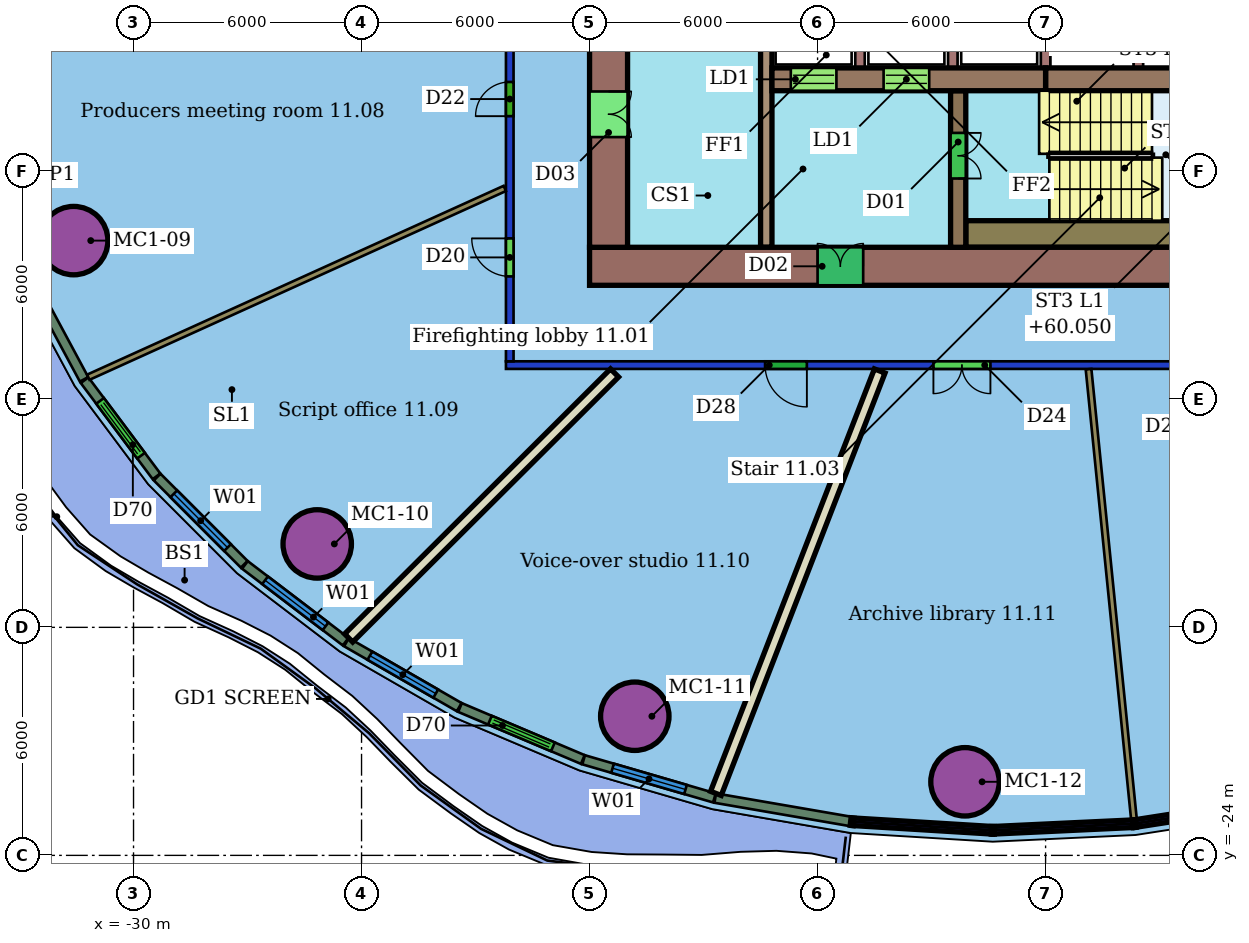
"""IFC4 building model, lengths in metres.
Left out: names, types, materials, properties, quantities, classifications, styles, units other than length and angle.
Written with IfcOpenShell. Run it as: python <this file> out.ifc"""

import sys

from ifc_helpers import new_model, si_unit, direction, frame, frame_2d, origin, origin_2d, place, context, subcontext, project, spatial, rectangle, hollow_circle, extrude, element, fill, save


model = new_model("IFC4")
c1 = context("Model", 3, precision=1e-05, world=origin(), true_north=direction((0.0, 1.0)))
c2 = subcontext(c1, "Body", "Model", "MODEL_VIEW")
j1 = project(units=[si_unit("LENGTHUNIT", "METRE"), si_unit("PLANEANGLEUNIT", "RADIAN")], contexts=[c1])
p1 = place(None, origin())
s1 = spatial("IfcSite", under=j1, at=p1, CompositionType="ELEMENT")
p2 = place(p1, origin())
s2 = spatial("IfcBuilding", under=s1, at=p2, CompositionType="ELEMENT")
p3 = place(p2, frame((0.0, 0.0, 58.2)))
s3 = spatial("IfcBuildingStorey", under=s2, at=p3, CompositionType="ELEMENT", Elevation=58.2)
for number, where, z_axis, x_axis in (
    (1, (-31.575, -7.824, 0.0), (0.0, 0.0, 1.0), (1.0, 0.0, 0.0)),
    (2, (-25.166, -15.805, 0.0), (0.0, 0.0, 1.0), (1.0, 0.0, 0.0)),
    (3, (-16.81, -20.339, 0.0), (0.0, 0.0, 1.0), (1.0, 0.0, 0.0)),
    (4, (-8.121, -22.064, 0.0), (0.0, 0.0, 1.0), (1.0, 0.0, 0.0)),
):
    element("IfcColumn", number, at=place(p3, frame(where, z_axis=z_axis, x_axis=x_axis)), inside=s3, PredefinedType="COLUMN", context=c2, shape_type="SweptSolid", body=[
        extrude(hollow_circle(Radius=0.9, WallThickness=0.06, at=origin_2d()), origin(), (0.0, 0.0, 1.0), 3.55),
    ])
p4 = place(p3, frame((8.2, -11.1, 0.0), z_axis=(0.0, 0.0, 1.0), x_axis=(-1.0, 0.0, 0.0)))
e5 = element("IfcWall", 5, at=p4, inside=s3, PredefinedType="PARTITIONING", context=c2, shape_type="SweptSolid", body=[
    extrude(rectangle(XDim=28.4, YDim=0.2, at=frame_2d((14.2, 0.0))), origin(), (0.0, 0.0, 1.0), 2.85),
])
p5 = place(p4, frame((20.481, 0.0, 0.0)))
e6 = element("IfcOpeningElement", 6, at=p5, cuts=e5, PredefinedType="OPENING", context=c2, shape_type="SweptSolid", body=[
    extrude(rectangle(XDim=1.1, YDim=2.1, at=frame_2d((0.55, 1.05))), frame((0.0, 0.11, 0.0), z_axis=(0.0, -1.0, 0.0), x_axis=(1.0, 0.0, 0.0)), (0.0, 0.0, 1.0), 0.22),
])
p6 = place(p4, frame((15.652, 0.0, 0.0)))
e7 = element("IfcOpeningElement", 7, at=p6, cuts=e5, PredefinedType="OPENING", context=c2, shape_type="SweptSolid", body=[
    extrude(rectangle(XDim=1.5, YDim=2.1, at=frame_2d((0.75, 1.05))), frame((0.0, 0.11, 0.0), z_axis=(0.0, -1.0, 0.0), x_axis=(1.0, 0.0, 0.0)), (0.0, 0.0, 1.0), 0.22),
])
p7 = place(p4, frame((7.719, 0.0, 0.0)))
e8 = element("IfcOpeningElement", 8, at=p7, cuts=e5, PredefinedType="OPENING", context=c2, shape_type="SweptSolid", body=[
    extrude(rectangle(XDim=1.8, YDim=2.1, at=frame_2d((0.9, 1.05))), frame((0.0, 0.11, 0.0), z_axis=(0.0, -1.0, 0.0), x_axis=(1.0, 0.0, 0.0)), (0.0, 0.0, 1.0), 0.22),
])
p8 = place(p3, frame((-20.1, -11.0, 0.0), z_axis=(0.0, 0.0, 1.0), x_axis=(0.0, 1.0, 0.0)))
e9 = element("IfcWall", 9, at=p8, inside=s3, PredefinedType="PARTITIONING", context=c2, shape_type="SweptSolid", body=[
    extrude(rectangle(XDim=22.0, YDim=0.2, at=frame_2d((11.0, 0.0))), origin(), (0.0, 0.0, 1.0), 2.85),
])
p9 = place(p8, frame((17.792, 0.0, 0.0)))
e10 = element("IfcOpeningElement", 10, at=p9, cuts=e9, PredefinedType="OPENING", context=c2, shape_type="SweptSolid", body=[
    extrude(rectangle(XDim=0.9, YDim=2.1, at=frame_2d((0.45, 1.05))), frame((0.0, 0.11, 0.0), z_axis=(0.0, -1.0, 0.0), x_axis=(1.0, 0.0, 0.0)), (0.0, 0.0, 1.0), 0.22),
])
p10 = place(p8, frame((13.558, 0.0, 0.0)))
e11 = element("IfcOpeningElement", 11, at=p10, cuts=e9, PredefinedType="OPENING", context=c2, shape_type="SweptSolid", body=[
    extrude(rectangle(XDim=1.1, YDim=2.1, at=frame_2d((0.55, 1.05))), frame((0.0, 0.11, 0.0), z_axis=(0.0, -1.0, 0.0), x_axis=(1.0, 0.0, 0.0)), (0.0, 0.0, 1.0), 0.22),
])
p11 = place(p8, frame((6.45, 0.0, 0.0)))
e12 = element("IfcOpeningElement", 12, at=p11, cuts=e9, PredefinedType="OPENING", context=c2, shape_type="SweptSolid", body=[
    extrude(rectangle(XDim=0.9, YDim=2.1, at=frame_2d((0.45, 1.05))), frame((0.0, 0.11, 0.0), z_axis=(0.0, -1.0, 0.0), x_axis=(1.0, 0.0, 0.0)), (0.0, 0.0, 1.0), 0.22),
])
p12 = place(p8, frame((2.234, 0.0, 0.0)))
e13 = element("IfcOpeningElement", 13, at=p12, cuts=e9, PredefinedType="OPENING", context=c2, shape_type="SweptSolid", body=[
    extrude(rectangle(XDim=1.0, YDim=2.1, at=frame_2d((0.5, 1.05))), frame((0.0, 0.11, 0.0), z_axis=(0.0, -1.0, 0.0), x_axis=(1.0, 0.0, 0.0)), (0.0, 0.0, 1.0), 0.22),
])
p13 = place(p3, frame((-31.19, -11.419, 0.0), z_axis=(0.0, 0.0, 1.0), x_axis=(0.91079054679, 0.412868719907, 0.0)))
e14 = element("IfcWall", 14, at=p13, inside=s3, PredefinedType="PARTITIONING", context=c2, shape_type="SweptSolid", body=[
    extrude(rectangle(XDim=12.033, YDim=0.15, at=frame_2d((6.017, 0.0))), origin(), (0.0, 0.0, 1.0), 3.55),
])
p14 = place(p3, frame((-24.339, -18.28, 0.0), z_axis=(0.0, 0.0, 1.0), x_axis=(0.708242772836, 0.705968961588, 0.0)))
e15 = element("IfcWall", 15, at=p14, inside=s3, PredefinedType="PARTITIONING", context=c2, shape_type="SweptSolid", body=[
    extrude(rectangle(XDim=9.878, YDim=0.3, at=frame_2d((4.939, 0.0))), origin(), (0.0, 0.0, 1.0), 3.55),
])
p15 = place(p3, frame((-14.676, -22.369, 0.0), z_axis=(0.0, 0.0, 1.0), x_axis=(0.361600153216, 0.932333271526, 0.0)))
e16 = element("IfcWall", 16, at=p15, inside=s3, PredefinedType="PARTITIONING", context=c2, shape_type="SweptSolid", body=[
    extrude(rectangle(XDim=11.921, YDim=0.3, at=frame_2d((5.961, 0.0))), origin(), (0.0, 0.0, 1.0), 3.55),
])
p16 = place(p3, frame((-3.676, -23.041, 0.0), z_axis=(0.0, 0.0, 1.0), x_axis=(-0.100357287096, 0.994951463603, 0.0)))
e17 = element("IfcWall", 17, at=p16, inside=s3, PredefinedType="PARTITIONING", context=c2, shape_type="SweptSolid", body=[
    extrude(rectangle(XDim=11.894, YDim=0.15, at=frame_2d((5.947, 0.0))), origin(), (0.0, 0.0, 1.0), 3.55),
])
p17 = place(p3, frame((-32.745, -8.79, 0.0), z_axis=(0.0, 0.0, 1.0), x_axis=(0.473545649415, -0.880769276213, 0.0)))
e18 = element("IfcWall", 18, at=p17, inside=s3, PredefinedType="SOLIDWALL", context=c2, shape_type="SweptSolid", body=[
    extrude(rectangle(XDim=3.048, YDim=0.25, at=frame_2d((1.524, 0.0))), origin(), (0.0, 0.0, 1.0), 3.15),
])
p18 = place(p3, frame((-31.288, -11.497, 0.0), z_axis=(0.0, 0.0, 1.0), x_axis=(0.59907224047, -0.800694979813, 0.0)))
e19 = element("IfcWall", 19, at=p18, inside=s3, PredefinedType="SOLIDWALL", context=c2, shape_type="SweptSolid", body=[
    extrude(rectangle(XDim=3.159, YDim=0.25, at=frame_2d((1.58, 0.0))), origin(), (0.0, 0.0, 1.0), 3.15),
])
p19 = place(p18, frame((0.68, 0.0, 0.0)))
e20 = element("IfcOpeningElement", 20, at=p19, cuts=e19, PredefinedType="OPENING", context=c2, shape_type="SweptSolid", body=[
    extrude(rectangle(XDim=1.8, YDim=2.4, at=frame_2d((0.9, 1.2))), frame((0.0, 0.135, 0.0), z_axis=(0.0, -1.0, 0.0), x_axis=(1.0, 0.0, 0.0)), (0.0, 0.0, 1.0), 0.27),
])
p20 = place(p3, frame((-29.378, -14.046, 0.0), z_axis=(0.0, 0.0, 1.0), x_axis=(0.706541864319, -0.707671247095, 0.0)))
e21 = element("IfcWall", 21, at=p20, inside=s3, PredefinedType="SOLIDWALL", context=c2, shape_type="SweptSolid", body=[
    extrude(rectangle(XDim=3.243, YDim=0.25, at=frame_2d((1.621, 0.0))), origin(), (0.0, 0.0, 1.0), 3.15),
])
p21 = place(p20, frame((0.621, 0.0, 0.8)))
e22 = element("IfcOpeningElement", 22, at=p21, cuts=e21, PredefinedType="OPENING", context=c2, shape_type="SweptSolid", body=[
    extrude(rectangle(XDim=2.0, YDim=2.2, at=frame_2d((1.0, 1.1))), frame((0.0, 0.135, 0.0), z_axis=(0.0, -1.0, 0.0), x_axis=(1.0, 0.0, 0.0)), (0.0, 0.0, 1.0), 0.27),
])
p22 = place(p3, frame((-27.069, -16.357, 0.0), z_axis=(0.0, 0.0, 1.0), x_axis=(0.795504012695, -0.605948319402, 0.0)))
e23 = element("IfcWall", 23, at=p22, inside=s3, PredefinedType="SOLIDWALL", context=c2, shape_type="SweptSolid", body=[
    extrude(rectangle(XDim=3.333, YDim=0.25, at=frame_2d((1.667, 0.0))), origin(), (0.0, 0.0, 1.0), 3.15),
])
p23 = place(p22, frame((0.667, 0.0, 0.8)))
e24 = element("IfcOpeningElement", 24, at=p23, cuts=e23, PredefinedType="OPENING", context=c2, shape_type="SweptSolid", body=[
    extrude(rectangle(XDim=2.0, YDim=2.2, at=frame_2d((1.0, 1.1))), frame((0.0, 0.135, 0.0), z_axis=(0.0, -1.0, 0.0), x_axis=(1.0, 0.0, 0.0)), (0.0, 0.0, 1.0), 0.27),
])
p24 = place(p3, frame((-24.397, -18.39, 0.0), z_axis=(0.0, 0.0, 1.0), x_axis=(0.866535553406, -0.499115352081, 0.0)))
e25 = element("IfcWall", 25, at=p24, inside=s3, PredefinedType="SOLIDWALL", context=c2, shape_type="SweptSolid", body=[
    extrude(rectangle(XDim=3.424, YDim=0.25, at=frame_2d((1.712, 0.0))), origin(), (0.0, 0.0, 1.0), 3.15),
])
p25 = place(p24, frame((0.712, 0.0, 0.8)))
e26 = element("IfcOpeningElement", 26, at=p25, cuts=e25, PredefinedType="OPENING", context=c2, shape_type="SweptSolid", body=[
    extrude(rectangle(XDim=2.0, YDim=2.2, at=frame_2d((1.0, 1.1))), frame((0.0, 0.135, 0.0), z_axis=(0.0, -1.0, 0.0), x_axis=(1.0, 0.0, 0.0)), (0.0, 0.0, 1.0), 0.27),
])
p26 = place(p3, frame((-21.409, -20.109, 0.0), z_axis=(0.0, 0.0, 1.0), x_axis=(0.920920201112, -0.389751181119, 0.0)))
e27 = element("IfcWall", 27, at=p26, inside=s3, PredefinedType="SOLIDWALL", context=c2, shape_type="SweptSolid", body=[
    extrude(rectangle(XDim=3.51, YDim=0.25, at=frame_2d((1.755, 0.0))), origin(), (0.0, 0.0, 1.0), 3.15),
])
p27 = place(p26, frame((0.855, 0.0, 0.0)))
e28 = element("IfcOpeningElement", 28, at=p27, cuts=e27, PredefinedType="OPENING", context=c2, shape_type="SweptSolid", body=[
    extrude(rectangle(XDim=1.8, YDim=2.4, at=frame_2d((0.9, 1.2))), frame((0.0, 0.135, 0.0), z_axis=(0.0, -1.0, 0.0), x_axis=(1.0, 0.0, 0.0)), (0.0, 0.0, 1.0), 0.27),
])
p28 = place(p3, frame((-18.156, -21.485, 0.0), z_axis=(0.0, 0.0, 1.0), x_axis=(0.960066333869, -0.279772469287, 0.0)))
e29 = element("IfcWall", 29, at=p28, inside=s3, PredefinedType="SOLIDWALL", context=c2, shape_type="SweptSolid", body=[
    extrude(rectangle(XDim=3.585, YDim=0.25, at=frame_2d((1.792, 0.0))), origin(), (0.0, 0.0, 1.0), 3.15),
])
p29 = place(p28, frame((0.792, 0.0, 0.8)))
e30 = element("IfcOpeningElement", 30, at=p29, cuts=e29, PredefinedType="OPENING", context=c2, shape_type="SweptSolid", body=[
    extrude(rectangle(XDim=2.0, YDim=2.2, at=frame_2d((1.0, 1.1))), frame((0.0, 0.135, 0.0), z_axis=(0.0, -1.0, 0.0), x_axis=(1.0, 0.0, 0.0)), (0.0, 0.0, 1.0), 0.27),
])
p30 = place(p3, frame((-14.693, -22.493, 0.0), z_axis=(0.0, 0.0, 1.0), x_axis=(0.985456592012, -0.169927352892, 0.0)))
e31 = element("IfcWall", 31, at=p30, inside=s3, PredefinedType="SOLIDWALL", context=c2, shape_type="SweptSolid", body=[
    extrude(rectangle(XDim=3.6, YDim=0.25, at=frame_2d((1.8, 0.0))), origin(), (0.0, 0.0, 1.0), 3.15),
])
p31 = place(p3, frame((-18.0, -8.5, 0.0), z_axis=(0.0, 0.0, 1.0), x_axis=(1.0, 0.0, 0.0)))
e32 = element("IfcWall", 32, at=p31, inside=s3, PredefinedType="SHEAR", context=c2, shape_type="SweptSolid", body=[
    extrude(rectangle(XDim=24.0, YDim=1.0, at=frame_2d((12.0, 0.0))), origin(), (0.0, 0.0, 1.0), 3.4),
])
p32 = place(p31, frame((6.0, 0.0, 0.0)))
e33 = element("IfcOpeningElement", 33, at=p32, cuts=e32, PredefinedType="OPENING", context=c2, shape_type="SweptSolid", body=[
    extrude(rectangle(XDim=1.2, YDim=2.1, at=frame_2d((0.6, 1.05))), frame((0.0, 0.51, 0.0), z_axis=(0.0, -1.0, 0.0), x_axis=(1.0, 0.0, 0.0)), (0.0, 0.0, 1.0), 1.02),
])
p33 = place(p3, frame((-17.5, 8.0, 0.0), z_axis=(0.0, 0.0, 1.0), x_axis=(0.0, -1.0, 0.0)))
e34 = element("IfcWall", 34, at=p33, inside=s3, PredefinedType="SHEAR", context=c2, shape_type="SweptSolid", body=[
    extrude(rectangle(XDim=16.0, YDim=1.0, at=frame_2d((8.0, 0.0))), origin(), (0.0, 0.0, 1.0), 3.4),
])
p34 = place(p33, frame((11.9, 0.0, 0.0)))
e35 = element("IfcOpeningElement", 35, at=p34, cuts=e34, PredefinedType="OPENING", context=c2, shape_type="SweptSolid", body=[
    extrude(rectangle(XDim=1.2, YDim=2.1, at=frame_2d((0.6, 1.05))), frame((0.0, 0.51, 0.0), z_axis=(0.0, -1.0, 0.0), x_axis=(1.0, 0.0, 0.0)), (0.0, 0.0, 1.0), 1.02),
])
p35 = place(p33, frame((2.9, 0.0, 0.0)))
e36 = element("IfcOpeningElement", 36, at=p35, cuts=e34, PredefinedType="OPENING", context=c2, shape_type="SweptSolid", body=[
    extrude(rectangle(XDim=1.2, YDim=2.1, at=frame_2d((0.6, 1.05))), frame((0.0, 0.51, 0.0), z_axis=(0.0, -1.0, 0.0), x_axis=(1.0, 0.0, 0.0)), (0.0, 0.0, 1.0), 1.02),
])
p36 = place(p3, frame((-13.2, -3.58, 0.0), z_axis=(0.0, 0.0, 1.0), x_axis=(1.0, 0.0, 0.0)))
e37 = element("IfcWall", 37, at=p36, inside=s3, PredefinedType="SHEAR", context=c2, shape_type="SweptSolid", body=[
    extrude(rectangle(XDim=7.2, YDim=0.6, at=frame_2d((3.6, 0.0))), origin(), (0.0, 0.0, 1.0), 3.4),
])
p37 = place(p36, frame((0.496, 0.0, 0.0)))
e38 = element("IfcOpeningElement", 38, at=p37, cuts=e37, PredefinedType="OPENING", context=c2, shape_type="SweptSolid", body=[
    extrude(rectangle(XDim=1.2, YDim=2.1, at=frame_2d((0.6, 1.05))), frame((0.0, 0.31, 0.0), z_axis=(0.0, -1.0, 0.0), x_axis=(1.0, 0.0, 0.0)), (0.0, 0.0, 1.0), 0.62),
])
p38 = place(p36, frame((2.938, 0.0, 0.0)))
e39 = element("IfcOpeningElement", 39, at=p38, cuts=e37, PredefinedType="OPENING", context=c2, shape_type="SweptSolid", body=[
    extrude(rectangle(XDim=1.2, YDim=2.1, at=frame_2d((0.6, 1.05))), frame((0.0, 0.31, 0.0), z_axis=(0.0, -1.0, 0.0), x_axis=(1.0, 0.0, 0.0)), (0.0, 0.0, 1.0), 0.62),
])
p39 = place(p3, frame((-6.0, -3.58, 0.0), z_axis=(0.0, 0.0, 1.0), x_axis=(1.0, 0.0, 0.0)))
e40 = element("IfcWall", 40, at=p39, inside=s3, PredefinedType="SHEAR", context=c2, shape_type="SweptSolid", body=[
    extrude(rectangle(XDim=7.2, YDim=0.6, at=frame_2d((3.6, 0.0))), origin(), (0.0, 0.0, 1.0), 3.4),
])
p40 = place(p3, frame((-13.35, 8.0, 0.0), z_axis=(0.0, 0.0, 1.0), x_axis=(0.0, -1.0, 0.0)))
e41 = element("IfcWall", 41, at=p40, inside=s3, PredefinedType="SHEAR", context=c2, shape_type="SweptSolid", body=[
    extrude(rectangle(XDim=16.0, YDim=0.3, at=frame_2d((8.0, 0.0))), origin(), (0.0, 0.0, 1.0), 3.4),
])
p41 = place(p40, frame((7.25, 0.0, 0.0)))
e42 = element("IfcOpeningElement", 42, at=p41, cuts=e41, PredefinedType="OPENING", context=c2, shape_type="SweptSolid", body=[
    extrude(rectangle(XDim=1.5, YDim=2.1, at=frame_2d((0.75, 1.05))), frame((0.0, 0.16, 0.0), z_axis=(0.0, -1.0, 0.0), x_axis=(1.0, 0.0, 0.0)), (0.0, 0.0, 1.0), 0.32),
])
p42 = place(p3, frame((-8.3, -3.88, 0.0), z_axis=(0.0, 0.0, 1.0), x_axis=(0.0, -1.0, 0.0)))
e43 = element("IfcWall", 43, at=p42, inside=s3, PredefinedType="SHEAR", context=c2, shape_type="SweptSolid", body=[
    extrude(rectangle(XDim=4.12, YDim=0.4, at=frame_2d((2.06, 0.0))), origin(), (0.0, 0.0, 1.0), 3.4),
])
p43 = place(p42, frame((1.11, 0.0, 0.0)))
e44 = element("IfcOpeningElement", 44, at=p43, cuts=e43, PredefinedType="OPENING", context=c2, shape_type="SweptSolid", body=[
    extrude(rectangle(XDim=1.2, YDim=2.1, at=frame_2d((0.6, 1.05))), frame((0.0, 0.21, 0.0), z_axis=(0.0, -1.0, 0.0), x_axis=(1.0, 0.0, 0.0)), (0.0, 0.0, 1.0), 0.42),
])
p44 = place(p3, frame((-8.1, -7.65, 0.0), z_axis=(0.0, 0.0, 1.0), x_axis=(1.0, 0.0, 0.0)))
e45 = element("IfcWall", 45, at=p44, inside=s3, PredefinedType="SHEAR", context=c2, shape_type="SweptSolid", body=[
    extrude(rectangle(XDim=7.05, YDim=0.7, at=frame_2d((3.525, 0.0))), origin(), (0.0, 0.0, 1.0), 3.4),
])
for number, where, z_axis, x_axis in (
    (46, (-10.883, -1.6, 0.0), (0.0, 0.0, 1.0), (0.0, -1.0, 0.0)),
    (47, (-8.442, -1.6, 0.0), (0.0, 0.0, 1.0), (0.0, -1.0, 0.0)),
    (48, (-6.0, -1.6, 0.0), (0.0, 0.0, 1.0), (0.0, -1.0, 0.0)),
    (49, (-3.558, -1.6, 0.0), (0.0, 0.0, 1.0), (0.0, -1.0, 0.0)),
):
    element("IfcWall", number, at=place(p3, frame(where, z_axis=z_axis, x_axis=x_axis)), inside=s3, PredefinedType="SHEAR", context=c2, shape_type="SweptSolid", body=[
        extrude(rectangle(XDim=1.68, YDim=0.25, at=frame_2d((0.84, 0.0))), origin(), (0.0, 0.0, 1.0), 3.4),
    ])
p45 = place(p11, origin())
e50 = element("IfcDoor", 50, at=p45, inside=s3, OperationType="SINGLE_SWING_LEFT", PredefinedType="DOOR", context=c2, shape_type="SweptSolid", body=[
    extrude(rectangle(XDim=0.9, YDim=2.1, at=frame_2d((0.45, 1.05))), frame((0.0, 0.025, 0.0), z_axis=(0.0, -1.0, 0.0), x_axis=(1.0, 0.0, 0.0)), (0.0, 0.0, 1.0), 0.05),
])
fill(e12, e50)
p46 = place(p12, origin())
e51 = element("IfcDoor", 51, at=p46, inside=s3, OperationType="SINGLE_SWING_RIGHT", PredefinedType="DOOR", context=c2, shape_type="SweptSolid", body=[
    extrude(rectangle(XDim=1.0, YDim=2.1, at=frame_2d((0.5, 1.05))), frame((0.0, 0.025, 0.0), z_axis=(0.0, -1.0, 0.0), x_axis=(1.0, 0.0, 0.0)), (0.0, 0.0, 1.0), 0.05),
])
fill(e13, e51)
p47 = place(p5, origin())
e52 = element("IfcDoor", 52, at=p47, inside=s3, OperationType="SINGLE_SWING_LEFT", PredefinedType="DOOR", context=c2, shape_type="SweptSolid", body=[
    extrude(rectangle(XDim=1.1, YDim=2.1, at=frame_2d((0.55, 1.05))), frame((0.0, 0.025, 0.0), z_axis=(0.0, -1.0, 0.0), x_axis=(1.0, 0.0, 0.0)), (0.0, 0.0, 1.0), 0.05),
])
fill(e6, e52)
p48 = place(p6, origin())
e53 = element("IfcDoor", 53, at=p48, inside=s3, OperationType="DOUBLE_DOOR_SINGLE_SWING", PredefinedType="DOOR", context=c2, shape_type="SweptSolid", body=[
    extrude(rectangle(XDim=1.5, YDim=2.1, at=frame_2d((0.75, 1.05))), frame((0.0, 0.025, 0.0), z_axis=(0.0, -1.0, 0.0), x_axis=(1.0, 0.0, 0.0)), (0.0, 0.0, 1.0), 0.05),
])
fill(e7, e53)
p49 = place(p19, origin())
e54 = element("IfcDoor", 54, at=p49, inside=s3, OperationType="DOUBLE_DOOR_SLIDING", PredefinedType="DOOR", context=c2, shape_type="SweptSolid", body=[
    extrude(rectangle(XDim=1.8, YDim=2.4, at=frame_2d((0.9, 1.2))), frame((0.0, 0.025, 0.0), z_axis=(0.0, -1.0, 0.0), x_axis=(1.0, 0.0, 0.0)), (0.0, 0.0, 1.0), 0.05),
])
fill(e20, e54)
p50 = place(p21, origin())
e55 = element("IfcWindow", 55, at=p50, inside=s3, PartitioningType="SINGLE_PANEL", PredefinedType="WINDOW", context=c2, shape_type="SweptSolid", body=[
    extrude(rectangle(XDim=2.0, YDim=2.2, at=frame_2d((1.0, 1.1))), frame((0.0, 0.03, 0.0), z_axis=(0.0, -1.0, 0.0), x_axis=(1.0, 0.0, 0.0)), (0.0, 0.0, 1.0), 0.06),
])
fill(e22, e55)
p51 = place(p23, origin())
e56 = element("IfcWindow", 56, at=p51, inside=s3, PartitioningType="SINGLE_PANEL", PredefinedType="WINDOW", context=c2, shape_type="SweptSolid", body=[
    extrude(rectangle(XDim=2.0, YDim=2.2, at=frame_2d((1.0, 1.1))), frame((0.0, 0.03, 0.0), z_axis=(0.0, -1.0, 0.0), x_axis=(1.0, 0.0, 0.0)), (0.0, 0.0, 1.0), 0.06),
])
fill(e24, e56)
p52 = place(p25, origin())
e57 = element("IfcWindow", 57, at=p52, inside=s3, PartitioningType="SINGLE_PANEL", PredefinedType="WINDOW", context=c2, shape_type="SweptSolid", body=[
    extrude(rectangle(XDim=2.0, YDim=2.2, at=frame_2d((1.0, 1.1))), frame((0.0, 0.03, 0.0), z_axis=(0.0, -1.0, 0.0), x_axis=(1.0, 0.0, 0.0)), (0.0, 0.0, 1.0), 0.06),
])
fill(e26, e57)
p53 = place(p27, origin())
e58 = element("IfcDoor", 58, at=p53, inside=s3, OperationType="DOUBLE_DOOR_SLIDING", PredefinedType="DOOR", context=c2, shape_type="SweptSolid", body=[
    extrude(rectangle(XDim=1.8, YDim=2.4, at=frame_2d((0.9, 1.2))), frame((0.0, 0.025, 0.0), z_axis=(0.0, -1.0, 0.0), x_axis=(1.0, 0.0, 0.0)), (0.0, 0.0, 1.0), 0.05),
])
fill(e28, e58)
p54 = place(p29, origin())
e59 = element("IfcWindow", 59, at=p54, inside=s3, PartitioningType="SINGLE_PANEL", PredefinedType="WINDOW", context=c2, shape_type="SweptSolid", body=[
    extrude(rectangle(XDim=2.0, YDim=2.2, at=frame_2d((1.0, 1.1))), frame((0.0, 0.03, 0.0), z_axis=(0.0, -1.0, 0.0), x_axis=(1.0, 0.0, 0.0)), (0.0, 0.0, 1.0), 0.06),
])
fill(e30, e59)
p55 = place(p32, origin())
e60 = element("IfcDoor", 60, at=p55, inside=s3, OperationType="DOUBLE_DOOR_SINGLE_SWING", PredefinedType="NOTDEFINED", context=c2, shape_type="SweptSolid", body=[
    extrude(rectangle(XDim=1.2, YDim=2.1, at=frame_2d((0.6, 1.05))), frame((0.0, 0.025, 0.0), z_axis=(0.0, -1.0, 0.0), x_axis=(1.0, 0.0, 0.0)), (0.0, 0.0, 1.0), 0.05),
])
fill(e33, e60)
p56 = place(p34, origin())
e61 = element("IfcDoor", 61, at=p56, inside=s3, OperationType="DOUBLE_DOOR_SINGLE_SWING", PredefinedType="NOTDEFINED", context=c2, shape_type="SweptSolid", body=[
    extrude(rectangle(XDim=1.2, YDim=2.1, at=frame_2d((0.6, 1.05))), frame((0.0, 0.025, 0.0), z_axis=(0.0, -1.0, 0.0), x_axis=(1.0, 0.0, 0.0)), (0.0, 0.0, 1.0), 0.05),
])
fill(e35, e61)
p57 = place(p37, origin())
e62 = element("IfcDoor", 62, at=p57, inside=s3, OperationType="DOUBLE_DOOR_SLIDING", PredefinedType="NOTDEFINED", context=c2, shape_type="SweptSolid", body=[
    extrude(rectangle(XDim=1.2, YDim=2.1, at=frame_2d((0.6, 1.05))), frame((0.0, 0.025, 0.0), z_axis=(0.0, -1.0, 0.0), x_axis=(1.0, 0.0, 0.0)), (0.0, 0.0, 1.0), 0.05),
])
fill(e38, e62)
p58 = place(p38, origin())
e63 = element("IfcDoor", 63, at=p58, inside=s3, OperationType="DOUBLE_DOOR_SLIDING", PredefinedType="NOTDEFINED", context=c2, shape_type="SweptSolid", body=[
    extrude(rectangle(XDim=1.2, YDim=2.1, at=frame_2d((0.6, 1.05))), frame((0.0, 0.025, 0.0), z_axis=(0.0, -1.0, 0.0), x_axis=(1.0, 0.0, 0.0)), (0.0, 0.0, 1.0), 0.05),
])
fill(e39, e63)
p59 = place(p43, origin())
e64 = element("IfcDoor", 64, at=p59, inside=s3, OperationType="DOUBLE_DOOR_SINGLE_SWING", PredefinedType="NOTDEFINED", context=c2, shape_type="SweptSolid", body=[
    extrude(rectangle(XDim=1.2, YDim=2.1, at=frame_2d((0.6, 1.05))), frame((0.0, 0.025, 0.0), z_axis=(0.0, -1.0, 0.0), x_axis=(1.0, 0.0, 0.0)), (0.0, 0.0, 1.0), 0.05),
])
fill(e44, e64)
save(model, sys.argv[1])
